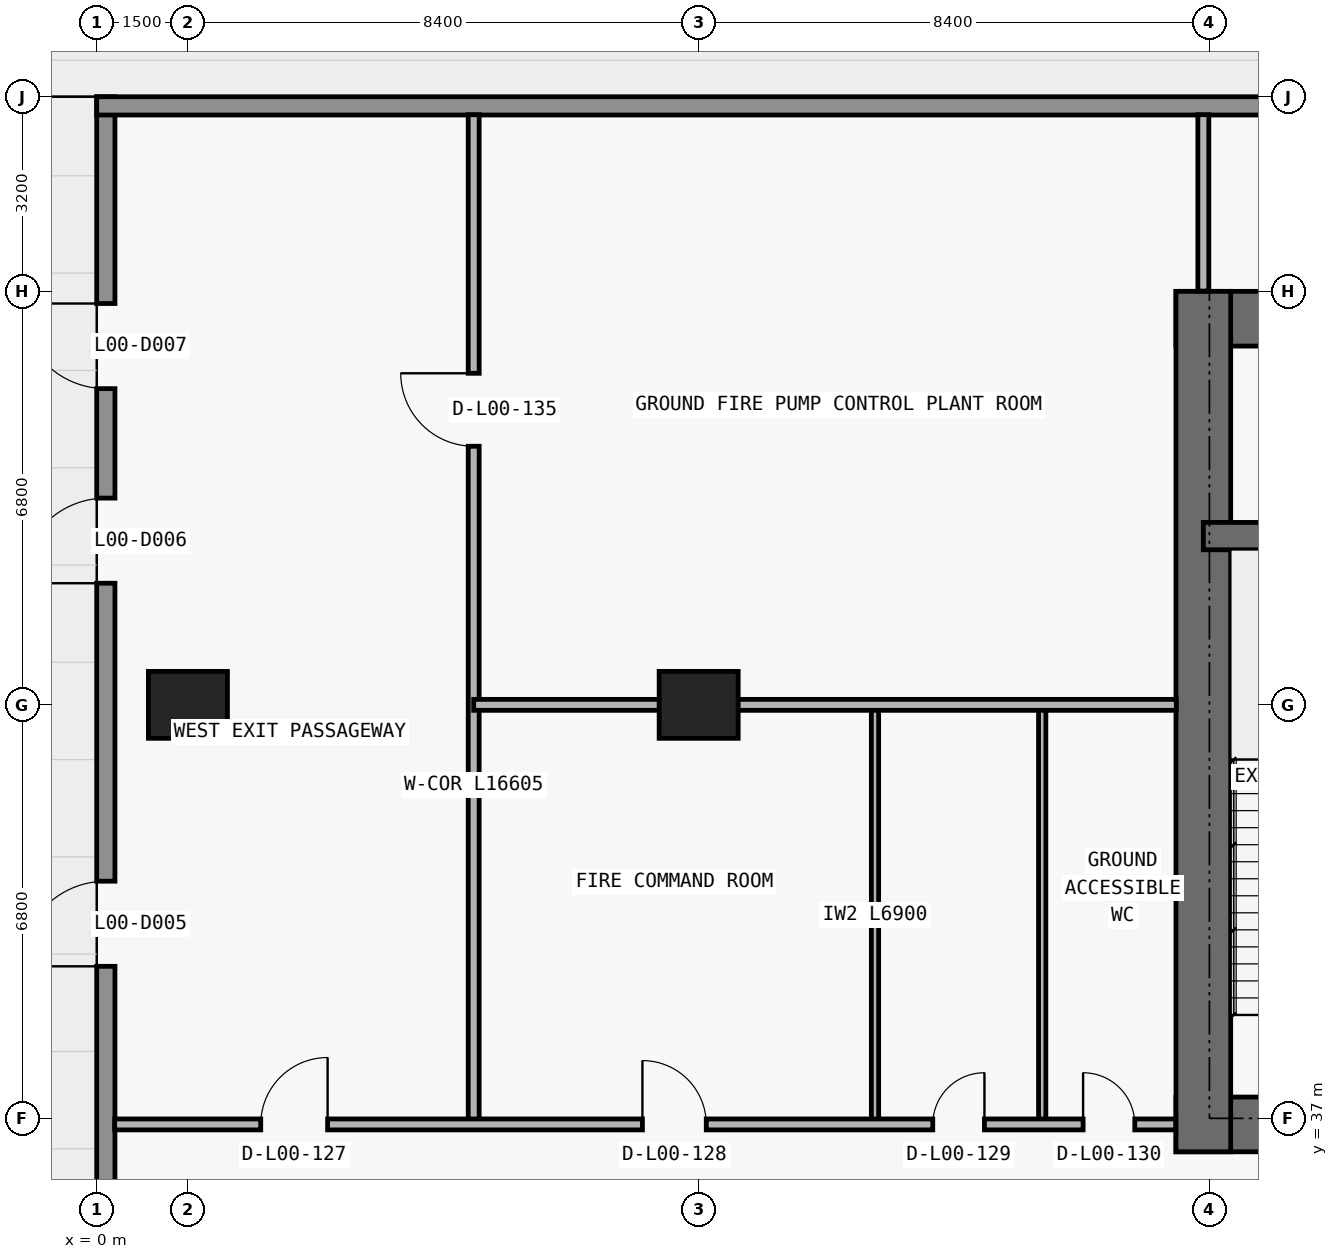
"""IFC4 building model, lengths in metres.
Left out: names, types, materials, properties, quantities, classifications, styles, units other than length and angle.
Written with IfcOpenShell. Run it as: python <this file> out.ifc"""

import sys

from ifc_helpers import new_model, si_unit, direction, frame, frame_2d, origin, origin_2d, place, context, subcontext, project, spatial, rectangle, extrude, element, fill, save


model = new_model("IFC4")
c1 = context("Model", 3, precision=1e-05, world=origin(), true_north=direction((0.0, 1.0)))
c2 = subcontext(c1, "Body", "Model", "MODEL_VIEW")
j1 = project(units=[si_unit("LENGTHUNIT", "METRE"), si_unit("PLANEANGLEUNIT", "RADIAN")], contexts=[c1])
p1 = place(None, origin())
s1 = spatial("IfcSite", under=j1, at=p1, CompositionType="ELEMENT")
p2 = place(p1, origin())
s2 = spatial("IfcBuilding", under=s1, at=p2, CompositionType="ELEMENT")
p3 = place(p2, origin())
s3 = spatial("IfcBuildingStorey", under=s2, at=p3, CompositionType="ELEMENT", Elevation=0.0)
for number, where, z_axis, x_axis in (
    (1, (1.5, 43.8, 0.0), (0.0, 0.0, 1.0), (1.0, 0.0, 0.0)),
    (2, (9.9, 43.8, 0.0), (0.0, 0.0, 1.0), (1.0, 0.0, 0.0)),
):
    element("IfcColumn", number, at=place(p3, frame(where, z_axis=z_axis, x_axis=x_axis)), inside=s3, PredefinedType="COLUMN", context=c2, shape_type="SweptSolid", body=[
        extrude(rectangle(XDim=1.3, YDim=1.1, at=origin_2d()), origin(), (0.0, 0.0, 1.0), 5.1),
    ])
p4 = place(p3, frame((17.75, 36.9, 0.0), z_axis=(0.0, 0.0, 1.0), x_axis=(1.0, 0.0, 0.0)))
e3 = element("IfcWall", 3, at=p4, inside=s3, PredefinedType="SHEAR", context=c2, shape_type="SweptSolid", body=[
    extrude(rectangle(XDim=42.3, YDim=0.9, at=frame_2d((21.15, 0.0))), origin(), (0.0, 0.0, 1.0), 5.1),
])
p5 = place(p4, frame((14.55, 0.0, 0.0)))
e4 = element("IfcOpeningElement", 4, at=p5, cuts=e3, PredefinedType="OPENING", context=c2, shape_type="SweptSolid", body=[
    extrude(rectangle(XDim=1.1, YDim=2.15, at=frame_2d((0.55, 1.075))), frame((0.0, 0.46, 0.0), z_axis=(0.0, -1.0, 0.0), x_axis=(1.0, 0.0, 0.0)), (0.0, 0.0, 1.0), 0.92),
])
p6 = place(p4, frame((6.4, 0.0, 0.0)))
e5 = element("IfcOpeningElement", 5, at=p6, cuts=e3, PredefinedType="OPENING", context=c2, shape_type="SweptSolid", body=[
    extrude(rectangle(XDim=1.05, YDim=2.15, at=frame_2d((0.525, 1.075))), frame((0.0, 0.46, 0.0), z_axis=(0.0, -1.0, 0.0), x_axis=(1.0, 0.0, 0.0)), (0.0, 0.0, 1.0), 0.92),
])
p7 = place(p4, frame((34.9, 0.0, 0.0)))
e6 = element("IfcOpeningElement", 6, at=p7, cuts=e3, PredefinedType="OPENING", context=c2, shape_type="SweptSolid", body=[
    extrude(rectangle(XDim=1.05, YDim=2.15, at=frame_2d((0.525, 1.075))), frame((0.0, 0.46, 0.0), z_axis=(0.0, -1.0, 0.0), x_axis=(1.0, 0.0, 0.0)), (0.0, 0.0, 1.0), 0.92),
])
p8 = place(p4, frame((11.012, 0.0, 0.0)))
e7 = element("IfcOpeningElement", 7, at=p8, cuts=e3, PredefinedType="OPENING", context=c2, shape_type="SweptSolid", body=[
    extrude(rectangle(XDim=1.05, YDim=2.15, at=frame_2d((0.525, 1.075))), frame((0.0, 0.46, 0.0), z_axis=(0.0, -1.0, 0.0), x_axis=(1.0, 0.0, 0.0)), (0.0, 0.0, 1.0), 0.92),
])
p9 = place(p4, frame((24.25, 0.0, 0.0)))
e8 = element("IfcOpeningElement", 8, at=p9, cuts=e3, PredefinedType="OPENING", context=c2, shape_type="SweptSolid", body=[
    extrude(rectangle(XDim=1.05, YDim=2.15, at=frame_2d((0.525, 1.075))), frame((0.0, 0.46, 0.0), z_axis=(0.0, -1.0, 0.0), x_axis=(1.0, 0.0, 0.0)), (0.0, 0.0, 1.0), 0.92),
])
p10 = place(p3, frame((17.75, 50.15, 0.0), z_axis=(0.0, 0.0, 1.0), x_axis=(1.0, 0.0, 0.0)))
e9 = element("IfcWall", 9, at=p10, inside=s3, PredefinedType="SHEAR", context=c2, shape_type="SweptSolid", body=[
    extrude(rectangle(XDim=42.3, YDim=0.9, at=frame_2d((21.15, 0.0))), origin(), (0.0, 0.0, 1.0), 5.1),
])
p11 = place(p3, frame((18.2, 36.45, 0.0), z_axis=(0.0, 0.0, 1.0), x_axis=(0.0, 1.0, 0.0)))
e10 = element("IfcWall", 10, at=p11, inside=s3, PredefinedType="SHEAR", context=c2, shape_type="SweptSolid", body=[
    extrude(rectangle(XDim=14.15, YDim=0.9, at=frame_2d((7.075, 0.0))), origin(), (0.0, 0.0, 1.0), 5.1),
])
p12 = place(p3, frame((18.2, 46.575, 0.0), z_axis=(0.0, 0.0, 1.0), x_axis=(1.0, 0.0, 0.0)))
e11 = element("IfcWall", 11, at=p12, inside=s3, PredefinedType="SHEAR", context=c2, shape_type="SweptSolid", body=[
    extrude(rectangle(XDim=41.4, YDim=0.45, at=frame_2d((20.7, 0.0))), origin(), (0.0, 0.0, 1.0), 5.1),
])
p13 = place(p12, frame((7.675, 0.0, 0.0)))
e12 = element("IfcOpeningElement", 12, at=p13, cuts=e11, PredefinedType="OPENING", context=c2, shape_type="SweptSolid", body=[
    extrude(rectangle(XDim=1.05, YDim=2.15, at=frame_2d((0.525, 1.075))), frame((0.0, 0.235, 0.0), z_axis=(0.0, -1.0, 0.0), x_axis=(1.0, 0.0, 0.0)), (0.0, 0.0, 1.0), 0.47),
])
p14 = place(p12, frame((32.725, 0.0, 0.0)))
e13 = element("IfcOpeningElement", 13, at=p14, cuts=e11, PredefinedType="OPENING", context=c2, shape_type="SweptSolid", body=[
    extrude(rectangle(XDim=1.05, YDim=2.15, at=frame_2d((0.525, 1.075))), frame((0.0, 0.235, 0.0), z_axis=(0.0, -1.0, 0.0), x_axis=(1.0, 0.0, 0.0)), (0.0, 0.0, 1.0), 0.47),
])
p15 = place(p3, frame((0.15, 0.0, 0.0), z_axis=(0.0, 0.0, 1.0), x_axis=(0.0, 1.0, 0.0)))
e14 = element("IfcWall", 14, at=p15, inside=s3, PredefinedType="STANDARD", context=c2, shape_type="SweptSolid", body=[
    extrude(rectangle(XDim=53.8, YDim=0.3, at=frame_2d((26.9, 0.0))), origin(), (0.0, 0.0, 1.0), 5.1),
])
p16 = place(p15, frame((39.5, 0.0, 0.0)))
e15 = element("IfcOpeningElement", 15, at=p16, cuts=e14, PredefinedType="OPENING", context=c2, shape_type="SweptSolid", body=[
    extrude(rectangle(XDim=1.4, YDim=2.2, at=frame_2d((0.7, 1.1))), frame((0.0, 0.16, 0.0), z_axis=(0.0, -1.0, 0.0), x_axis=(1.0, 0.0, 0.0)), (0.0, 0.0, 1.0), 0.32),
])
p17 = place(p15, frame((45.8, 0.0, 0.0)))
e16 = element("IfcOpeningElement", 16, at=p17, cuts=e14, PredefinedType="OPENING", context=c2, shape_type="SweptSolid", body=[
    extrude(rectangle(XDim=1.4, YDim=2.2, at=frame_2d((0.7, 1.1))), frame((0.0, 0.16, 0.0), z_axis=(0.0, -1.0, 0.0), x_axis=(1.0, 0.0, 0.0)), (0.0, 0.0, 1.0), 0.32),
])
p18 = place(p15, frame((49.0, 0.0, 0.0)))
e17 = element("IfcOpeningElement", 17, at=p18, cuts=e14, PredefinedType="OPENING", context=c2, shape_type="SweptSolid", body=[
    extrude(rectangle(XDim=1.4, YDim=2.2, at=frame_2d((0.7, 1.1))), frame((0.0, 0.16, 0.0), z_axis=(0.0, -1.0, 0.0), x_axis=(1.0, 0.0, 0.0)), (0.0, 0.0, 1.0), 0.32),
])
p19 = place(p3, frame((0.0, 53.65, 0.0), z_axis=(0.0, 0.0, 1.0), x_axis=(1.0, 0.0, 0.0)))
e18 = element("IfcWall", 18, at=p19, inside=s3, PredefinedType="STANDARD", context=c2, shape_type="SweptSolid", body=[
    extrude(rectangle(XDim=77.8, YDim=0.3, at=frame_2d((38.9, 0.0))), origin(), (0.0, 0.0, 1.0), 5.1),
])
p20 = place(p3, frame((6.2, 36.9, 0.0), z_axis=(0.0, 0.0, 1.0), x_axis=(0.0, 1.0, 0.0)))
e19 = element("IfcWall", 19, at=p20, inside=s3, PredefinedType="PARTITIONING", context=c2, shape_type="SweptSolid", body=[
    extrude(rectangle(XDim=16.605, YDim=0.18, at=frame_2d((8.302, 0.0))), origin(), (0.0, 0.0, 1.0), 5.1),
])
p21 = place(p20, frame((11.153, 0.0, 0.0)))
e20 = element("IfcOpeningElement", 20, at=p21, cuts=e19, PredefinedType="OPENING", context=c2, shape_type="SweptSolid", body=[
    extrude(rectangle(XDim=1.2, YDim=2.2, at=frame_2d((0.6, 1.1))), frame((0.0, 0.1, 0.0), z_axis=(0.0, -1.0, 0.0), x_axis=(1.0, 0.0, 0.0)), (0.0, 0.0, 1.0), 0.2),
])
for number, where, z_axis, x_axis in (
    (21, (12.8, 36.9, 0.0), (0.0, 0.0, 1.0), (0.0, 1.0, 0.0)),
    (22, (15.55, 36.9, 0.0), (0.0, 0.0, 1.0), (0.0, 1.0, 0.0)),
):
    element("IfcWall", number, at=place(p3, frame(where, z_axis=z_axis, x_axis=x_axis)), inside=s3, PredefinedType="PARTITIONING", context=c2, shape_type="SweptSolid", body=[
        extrude(rectangle(XDim=6.9, YDim=0.12, at=frame_2d((3.45, 0.0))), origin(), (0.0, 0.0, 1.0), 5.1),
    ])
p22 = place(p3, frame((18.2, 50.605, 0.0), z_axis=(0.0, 0.0, 1.0), x_axis=(0.0, 1.0, 0.0)))
e23 = element("IfcWall", 23, at=p22, inside=s3, PredefinedType="PARTITIONING", context=c2, shape_type="SweptSolid", body=[
    extrude(rectangle(XDim=2.9, YDim=0.18, at=frame_2d((1.45, 0.0))), origin(), (0.0, 0.0, 1.0), 5.1),
])
p23 = place(p3, frame((0.295, 36.9, 0.0), z_axis=(0.0, 0.0, 1.0), x_axis=(1.0, 0.0, 0.0)))
e24 = element("IfcWall", 24, at=p23, inside=s3, PredefinedType="PARTITIONING", context=c2, shape_type="SweptSolid", body=[
    extrude(rectangle(XDim=17.45, YDim=0.18, at=frame_2d((8.725, 0.0))), origin(), (0.0, 0.0, 1.0), 5.1),
])
p24 = place(p23, frame((2.403, 0.0, 0.0)))
e25 = element("IfcOpeningElement", 25, at=p24, cuts=e24, PredefinedType="OPENING", context=c2, shape_type="SweptSolid", body=[
    extrude(rectangle(XDim=1.1, YDim=2.15, at=frame_2d((0.55, 1.075))), frame((0.0, 0.1, 0.0), z_axis=(0.0, -1.0, 0.0), x_axis=(1.0, 0.0, 0.0)), (0.0, 0.0, 1.0), 0.2),
])
p25 = place(p23, frame((8.68, 0.0, 0.0)))
e26 = element("IfcOpeningElement", 26, at=p25, cuts=e24, PredefinedType="OPENING", context=c2, shape_type="SweptSolid", body=[
    extrude(rectangle(XDim=1.05, YDim=2.15, at=frame_2d((0.525, 1.075))), frame((0.0, 0.1, 0.0), z_axis=(0.0, -1.0, 0.0), x_axis=(1.0, 0.0, 0.0)), (0.0, 0.0, 1.0), 0.2),
])
p26 = place(p23, frame((13.455, 0.0, 0.0)))
e27 = element("IfcOpeningElement", 27, at=p26, cuts=e24, PredefinedType="OPENING", context=c2, shape_type="SweptSolid", body=[
    extrude(rectangle(XDim=0.85, YDim=2.1, at=frame_2d((0.425, 1.05))), frame((0.0, 0.1, 0.0), z_axis=(0.0, -1.0, 0.0), x_axis=(1.0, 0.0, 0.0)), (0.0, 0.0, 1.0), 0.2),
])
p27 = place(p23, frame((15.927, 0.0, 0.0)))
e28 = element("IfcOpeningElement", 28, at=p27, cuts=e24, PredefinedType="OPENING", context=c2, shape_type="SweptSolid", body=[
    extrude(rectangle(XDim=0.85, YDim=2.1, at=frame_2d((0.425, 1.05))), frame((0.0, 0.1, 0.0), z_axis=(0.0, -1.0, 0.0), x_axis=(1.0, 0.0, 0.0)), (0.0, 0.0, 1.0), 0.2),
])
p28 = place(p3, frame((6.2, 43.8, 0.0), z_axis=(0.0, 0.0, 1.0), x_axis=(1.0, 0.0, 0.0)))
e29 = element("IfcWall", 29, at=p28, inside=s3, PredefinedType="PARTITIONING", context=c2, shape_type="SweptSolid", body=[
    extrude(rectangle(XDim=11.555, YDim=0.18, at=frame_2d((5.777, 0.0))), origin(), (0.0, 0.0, 1.0), 4.389),
])
p29 = place(p16, origin())
e30 = element("IfcDoor", 30, at=p29, inside=s3, OperationType="SINGLE_SWING_LEFT", PredefinedType="DOOR", context=c2, shape_type="SweptSolid", body=[
    extrude(rectangle(XDim=1.4, YDim=2.2, at=frame_2d((0.7, 1.1))), frame((0.0, 0.025, 0.0), z_axis=(0.0, -1.0, 0.0), x_axis=(1.0, 0.0, 0.0)), (0.0, 0.0, 1.0), 0.05),
])
fill(e15, e30)
p30 = place(p17, origin())
e31 = element("IfcDoor", 31, at=p30, inside=s3, OperationType="SINGLE_SWING_LEFT", PredefinedType="DOOR", context=c2, shape_type="SweptSolid", body=[
    extrude(rectangle(XDim=1.4, YDim=2.2, at=frame_2d((0.7, 1.1))), frame((0.0, 0.025, 0.0), z_axis=(0.0, -1.0, 0.0), x_axis=(1.0, 0.0, 0.0)), (0.0, 0.0, 1.0), 0.05),
])
fill(e16, e31)
p31 = place(p18, origin())
e32 = element("IfcDoor", 32, at=p31, inside=s3, OperationType="SINGLE_SWING_RIGHT", PredefinedType="DOOR", context=c2, shape_type="SweptSolid", body=[
    extrude(rectangle(XDim=1.4, YDim=2.2, at=frame_2d((0.7, 1.1))), frame((0.0, 0.025, 0.0), z_axis=(0.0, -1.0, 0.0), x_axis=(1.0, 0.0, 0.0)), (0.0, 0.0, 1.0), 0.05),
])
fill(e17, e32)
p32 = place(p24, origin())
e33 = element("IfcDoor", 33, at=p32, inside=s3, OperationType="SINGLE_SWING_RIGHT", PredefinedType="DOOR", context=c2, shape_type="SweptSolid", body=[
    extrude(rectangle(XDim=1.1, YDim=2.15, at=frame_2d((0.55, 1.075))), frame((0.0, 0.025, 0.0), z_axis=(0.0, -1.0, 0.0), x_axis=(1.0, 0.0, 0.0)), (0.0, 0.0, 1.0), 0.05),
])
fill(e25, e33)
p33 = place(p25, origin())
e34 = element("IfcDoor", 34, at=p33, inside=s3, OperationType="SINGLE_SWING_LEFT", PredefinedType="DOOR", context=c2, shape_type="SweptSolid", body=[
    extrude(rectangle(XDim=1.05, YDim=2.15, at=frame_2d((0.525, 1.075))), frame((0.0, 0.025, 0.0), z_axis=(0.0, -1.0, 0.0), x_axis=(1.0, 0.0, 0.0)), (0.0, 0.0, 1.0), 0.05),
])
fill(e26, e34)
p34 = place(p26, origin())
e35 = element("IfcDoor", 35, at=p34, inside=s3, OperationType="SINGLE_SWING_RIGHT", PredefinedType="DOOR", context=c2, shape_type="SweptSolid", body=[
    extrude(rectangle(XDim=0.85, YDim=2.1, at=frame_2d((0.425, 1.05))), frame((0.0, 0.025, 0.0), z_axis=(0.0, -1.0, 0.0), x_axis=(1.0, 0.0, 0.0)), (0.0, 0.0, 1.0), 0.05),
])
fill(e27, e35)
p35 = place(p27, origin())
e36 = element("IfcDoor", 36, at=p35, inside=s3, OperationType="SINGLE_SWING_LEFT", PredefinedType="DOOR", context=c2, shape_type="SweptSolid", body=[
    extrude(rectangle(XDim=0.85, YDim=2.1, at=frame_2d((0.425, 1.05))), frame((0.0, 0.025, 0.0), z_axis=(0.0, -1.0, 0.0), x_axis=(1.0, 0.0, 0.0)), (0.0, 0.0, 1.0), 0.05),
])
fill(e28, e36)
p36 = place(p21, origin())
e37 = element("IfcDoor", 37, at=p36, inside=s3, OperationType="SINGLE_SWING_RIGHT", PredefinedType="DOOR", context=c2, shape_type="SweptSolid", body=[
    extrude(rectangle(XDim=1.2, YDim=2.2, at=frame_2d((0.6, 1.1))), frame((0.0, 0.025, 0.0), z_axis=(0.0, -1.0, 0.0), x_axis=(1.0, 0.0, 0.0)), (0.0, 0.0, 1.0), 0.05),
])
fill(e20, e37)
save(model, sys.argv[1])
